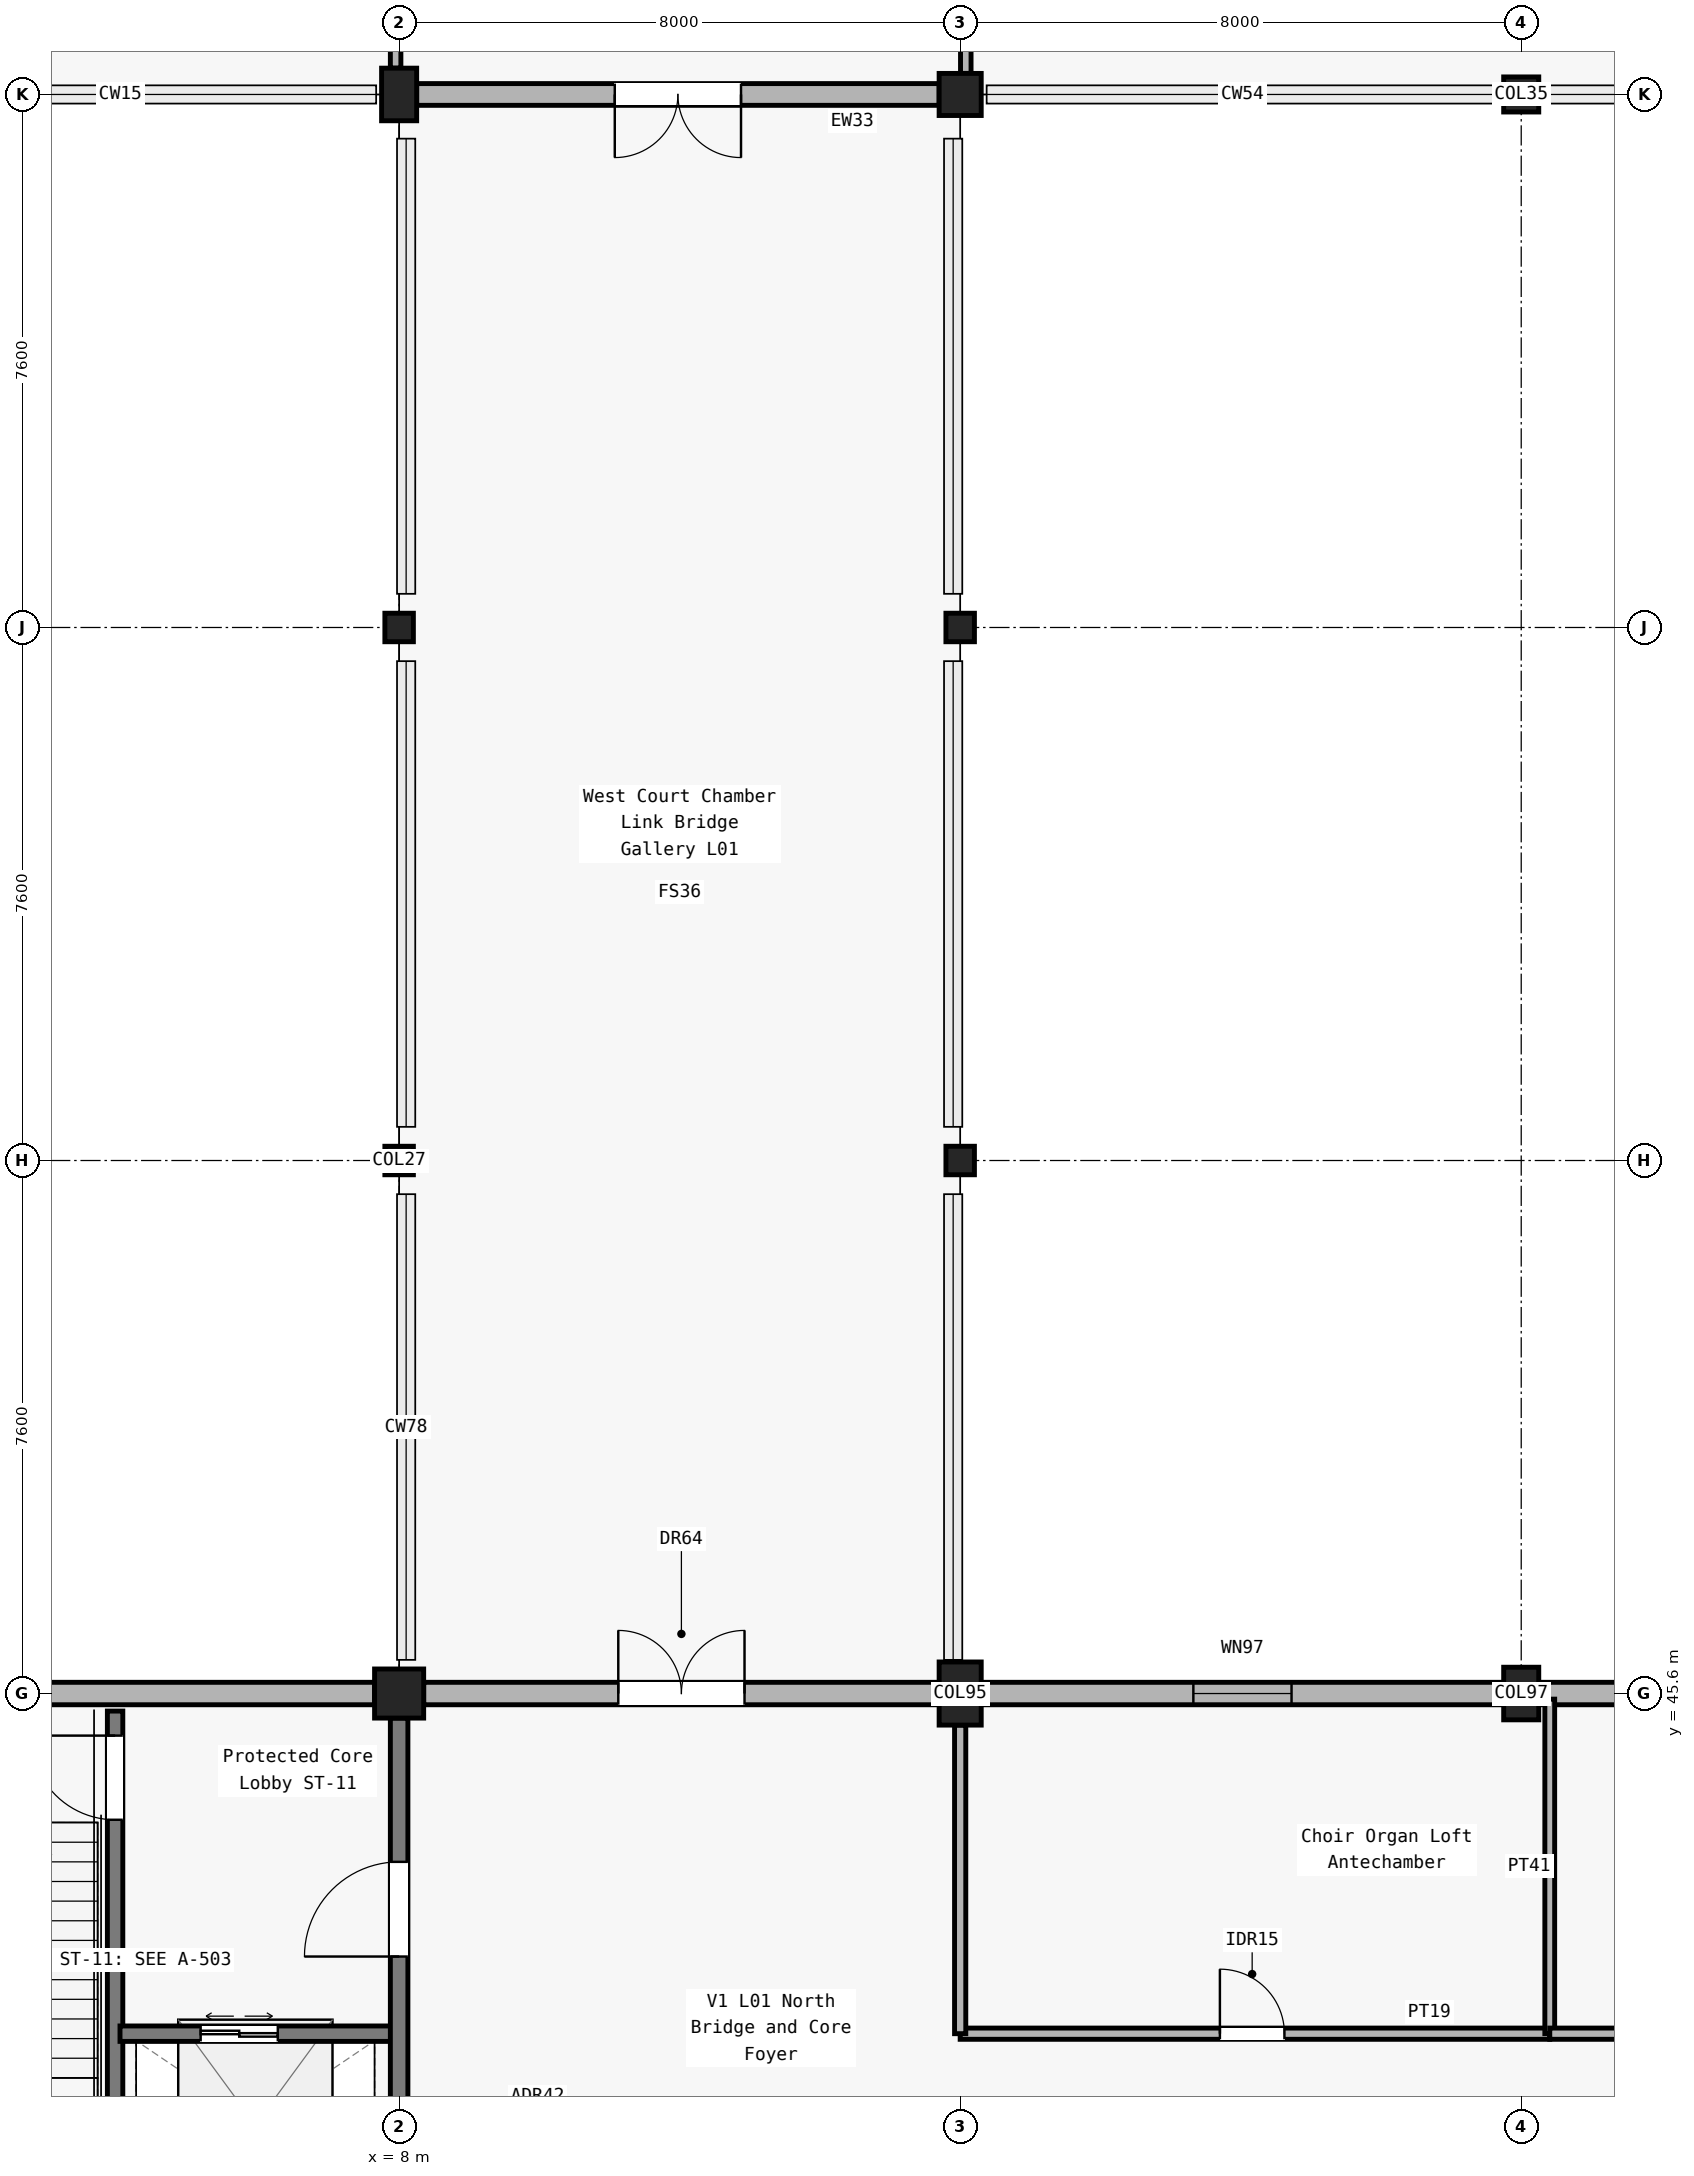
"""IFC4 building model, lengths in metres.
Left out: names, types, materials, properties, quantities, classifications, styles, units other than length and angle.
Written with IfcOpenShell. Run it as: python <this file> out.ifc"""

import sys

from ifc_helpers import new_model, si_unit, direction, frame, frame_2d, origin, origin_2d, place, context, subcontext, project, spatial, rectangle, hollow_circle, extrude, element, fill, save


model = new_model("IFC4")
c1 = context("Model", 3, precision=1e-05, world=origin(), true_north=direction((0.0, 1.0)))
c2 = subcontext(c1, "Body", "Model", "MODEL_VIEW")
j1 = project(units=[si_unit("LENGTHUNIT", "METRE"), si_unit("PLANEANGLEUNIT", "RADIAN")], contexts=[c1])
p1 = place(None, origin())
s1 = spatial("IfcSite", under=j1, at=p1, CompositionType="ELEMENT")
p2 = place(p1, origin())
s2 = spatial("IfcBuilding", under=s1, at=p2, CompositionType="ELEMENT")
p3 = place(p2, frame((0.0, 0.0, 5.4)))
s3 = spatial("IfcBuildingStorey", under=s2, at=p3, CompositionType="ELEMENT", Elevation=5.4)
p4 = place(p3, frame((8.0, 45.6, 0.0), z_axis=(0.0, 0.0, 1.0), x_axis=(1.0, 0.0, 0.0)))
e1 = element("IfcColumn", 1, at=p4, inside=s3, PredefinedType="COLUMN", context=c2, shape_type="SweptSolid", body=[
    extrude(rectangle(XDim=0.7, YDim=0.7, at=origin_2d()), origin(), (0.0, 0.0, 1.0), 4.8),
])
p5 = place(p3, frame((16.0, 45.6, 0.0), z_axis=(0.0, 0.0, 1.0), x_axis=(1.0, 0.0, 0.0)))
e2 = element("IfcColumn", 2, at=p5, inside=s3, PredefinedType="COLUMN", context=c2, shape_type="SweptSolid", body=[
    extrude(rectangle(XDim=0.6, YDim=0.9, at=origin_2d()), origin(), (0.0, 0.0, 1.0), 4.8),
])
for number, where, z_axis, x_axis in (
    (3, (24.0, 45.6, 0.0), (0.0, 0.0, 1.0), (1.0, 0.0, 0.0)),
    (4, (8.0, 68.4, 0.0), (0.0, 0.0, 1.0), (1.0, 0.0, 0.0)),
):
    element("IfcColumn", number, at=place(p3, frame(where, z_axis=z_axis, x_axis=x_axis)), inside=s3, PredefinedType="COLUMN", context=c2, shape_type="SweptSolid", body=[
        extrude(rectangle(XDim=0.5, YDim=0.75, at=origin_2d()), origin(), (0.0, 0.0, 1.0), 4.8),
    ])
p6 = place(p3, frame((16.0, 68.4, 0.0), z_axis=(0.0, 0.0, 1.0), x_axis=(1.0, 0.0, 0.0)))
e5 = element("IfcColumn", 5, at=p6, inside=s3, PredefinedType="COLUMN", context=c2, shape_type="SweptSolid", body=[
    extrude(rectangle(XDim=0.6, YDim=0.6, at=origin_2d()), origin(), (0.0, 0.0, 1.0), 4.8),
])
p7 = place(p3, frame((24.0, 68.4, 0.0), z_axis=(0.0, 0.0, 1.0), x_axis=(1.0, 0.0, 0.0)))
e6 = element("IfcColumn", 6, at=p7, inside=s3, PredefinedType="COLUMN", context=c2, shape_type="SweptSolid", body=[
    extrude(rectangle(XDim=0.5, YDim=0.5, at=origin_2d()), origin(), (0.0, 0.0, 1.0), 4.8),
])
for number, where, z_axis, x_axis in (
    (7, (8.0, 53.2, 0.0), (0.0, 0.0, 1.0), (1.0, 0.0, 0.0)),
    (8, (8.0, 60.8, 0.0), (0.0, 0.0, 1.0), (1.0, 0.0, 0.0)),
    (9, (16.0, 53.2, 0.0), (0.0, 0.0, 1.0), (1.0, 0.0, 0.0)),
    (10, (16.0, 60.8, 0.0), (0.0, 0.0, 1.0), (1.0, 0.0, 0.0)),
):
    element("IfcColumn", number, at=place(p3, frame(where, z_axis=z_axis, x_axis=x_axis)), inside=s3, PredefinedType="COLUMN", context=c2, shape_type="SweptSolid", body=[
        extrude(hollow_circle(Radius=0.203, WallThickness=0.02, at=origin_2d()), origin(), (0.0, 0.0, 1.0), 4.8),
    ])
p8 = place(p3, frame((0.4, 45.6, 0.0), z_axis=(0.0, 0.0, 1.0), x_axis=(1.0, 0.0, 0.0)))
e11 = element("IfcWall", 11, at=p8, inside=s3, PredefinedType="SOLIDWALL", context=c2, shape_type="SweptSolid", body=[
    extrude(rectangle(XDim=7.25, YDim=0.32, at=frame_2d((3.625, 0.0))), origin(), (0.0, 0.0, 1.0), 3.85),
])
p9 = place(p3, frame((8.35, 45.6, 0.0), z_axis=(0.0, 0.0, 1.0), x_axis=(1.0, 0.0, 0.0)))
e12 = element("IfcWall", 12, at=p9, inside=s3, PredefinedType="SOLIDWALL", context=c2, shape_type="SweptSolid", body=[
    extrude(rectangle(XDim=7.35, YDim=0.32, at=frame_2d((3.675, 0.0))), origin(), (0.0, 0.0, 1.0), 3.85),
])
p10 = place(p9, frame((2.775, 0.0, 0.0)))
e13 = element("IfcOpeningElement", 13, at=p10, cuts=e12, PredefinedType="OPENING", context=c2, shape_type="SweptSolid", body=[
    extrude(rectangle(XDim=1.8, YDim=2.25, at=frame_2d((0.9, 1.125))), frame((0.0, 0.17, 0.0), z_axis=(0.0, -1.0, 0.0), x_axis=(1.0, 0.0, 0.0)), (0.0, 0.0, 1.0), 0.34),
])
p11 = place(p3, frame((16.3, 45.6, 0.0), z_axis=(0.0, 0.0, 1.0), x_axis=(1.0, 0.0, 0.0)))
e14 = element("IfcWall", 14, at=p11, inside=s3, PredefinedType="SOLIDWALL", context=c2, shape_type="SweptSolid", body=[
    extrude(rectangle(XDim=7.45, YDim=0.32, at=frame_2d((3.725, 0.0))), origin(), (0.0, 0.0, 1.0), 3.85),
])
p12 = place(p11, frame((3.025, 0.0, 0.95)))
e15 = element("IfcOpeningElement", 15, at=p12, cuts=e14, PredefinedType="OPENING", context=c2, shape_type="SweptSolid", body=[
    extrude(rectangle(XDim=1.4, YDim=1.95, at=frame_2d((0.7, 0.975))), frame((0.0, 0.17, 0.0), z_axis=(0.0, -1.0, 0.0), x_axis=(1.0, 0.0, 0.0)), (0.0, 0.0, 1.0), 0.34),
])
p13 = place(p3, frame((24.25, 45.6, 0.0), z_axis=(0.0, 0.0, 1.0), x_axis=(1.0, 0.0, 0.0)))
e16 = element("IfcWall", 16, at=p13, inside=s3, PredefinedType="SOLIDWALL", context=c2, shape_type="SweptSolid", body=[
    extrude(rectangle(XDim=7.45, YDim=0.32, at=frame_2d((3.725, 0.0))), origin(), (0.0, 0.0, 1.0), 3.9),
])
p14 = place(p13, frame((2.925, 0.0, 0.95)))
e17 = element("IfcOpeningElement", 17, at=p14, cuts=e16, PredefinedType="OPENING", context=c2, shape_type="SweptSolid", body=[
    extrude(rectangle(XDim=1.6, YDim=1.95, at=frame_2d((0.8, 0.975))), frame((0.0, 0.17, 0.0), z_axis=(0.0, -1.0, 0.0), x_axis=(1.0, 0.0, 0.0)), (0.0, 0.0, 1.0), 0.34),
])
p15 = place(p3, frame((15.7, 68.4, 0.0), z_axis=(0.0, 0.0, 1.0), x_axis=(-1.0, 0.0, 0.0)))
e18 = element("IfcWall", 18, at=p15, inside=s3, PredefinedType="SOLIDWALL", context=c2, shape_type="SweptSolid", body=[
    extrude(rectangle(XDim=7.45, YDim=0.31, at=frame_2d((3.725, 0.0))), origin(), (0.0, 0.0, 1.0), 4.2),
])
p16 = place(p15, frame((2.825, 0.0, 0.0)))
e19 = element("IfcOpeningElement", 19, at=p16, cuts=e18, PredefinedType="OPENING", context=c2, shape_type="SweptSolid", body=[
    extrude(rectangle(XDim=1.8, YDim=2.25, at=frame_2d((0.9, 1.125))), frame((0.0, 0.165, 0.0), z_axis=(0.0, -1.0, 0.0), x_axis=(1.0, 0.0, 0.0)), (0.0, 0.0, 1.0), 0.33),
])
p17 = place(p3, frame((3.95, 38.25, 0.0), z_axis=(0.0, 0.0, 1.0), x_axis=(0.0, 1.0, 0.0)))
e20 = element("IfcWall", 20, at=p17, inside=s3, PredefinedType="SOLIDWALL", context=c2, shape_type="SweptSolid", body=[
    extrude(rectangle(XDim=7.1, YDim=0.22, at=frame_2d((3.55, 0.0))), origin(), (0.0, 0.0, 1.0), 4.51),
])
p18 = place(p17, frame((5.55, 0.0, 0.0)))
e21 = element("IfcOpeningElement", 21, at=p18, cuts=e20, PredefinedType="OPENING", context=c2, shape_type="SweptSolid", body=[
    extrude(rectangle(XDim=1.2, YDim=2.15, at=frame_2d((0.6, 1.075))), frame((0.0, 0.12, 0.0), z_axis=(0.0, -1.0, 0.0), x_axis=(1.0, 0.0, 0.0)), (0.0, 0.0, 1.0), 0.24),
])
p19 = place(p3, frame((4.02, 40.75, 0.0), z_axis=(0.0, 0.0, 1.0), x_axis=(1.0, 0.0, 0.0)))
e22 = element("IfcWall", 22, at=p19, inside=s3, PredefinedType="SOLIDWALL", context=c2, shape_type="SweptSolid", body=[
    extrude(rectangle(XDim=3.93, YDim=0.22, at=frame_2d((1.965, 0.0))), origin(), (0.0, 0.0, 1.0), 3.86),
])
p20 = place(p19, frame((1.15, 0.0, 0.0)))
e23 = element("IfcOpeningElement", 23, at=p20, cuts=e22, PredefinedType="OPENING", context=c2, shape_type="SweptSolid", body=[
    extrude(rectangle(XDim=1.1, YDim=2.2, at=frame_2d((0.55, 1.1))), frame((0.0, 0.12, 0.0), z_axis=(0.0, -1.0, 0.0), x_axis=(1.0, 0.0, 0.0)), (0.0, 0.0, 1.0), 0.24),
])
p21 = place(p3, frame((8.0, 38.4, 0.0), z_axis=(0.0, 0.0, 1.0), x_axis=(0.0, 1.0, 0.0)))
e24 = element("IfcWall", 24, at=p21, inside=s3, PredefinedType="SOLIDWALL", context=c2, shape_type="SweptSolid", body=[
    extrude(rectangle(XDim=6.85, YDim=0.25, at=frame_2d((3.425, 0.0))), origin(), (0.0, 0.0, 1.0), 3.635),
])
p22 = place(p21, frame((3.45, 0.0, 0.0)))
e25 = element("IfcOpeningElement", 25, at=p22, cuts=e24, PredefinedType="OPENING", context=c2, shape_type="SweptSolid", body=[
    extrude(rectangle(XDim=1.35, YDim=2.2, at=frame_2d((0.675, 1.1))), frame((0.0, 0.135, 0.0), z_axis=(0.0, -1.0, 0.0), x_axis=(1.0, 0.0, 0.0)), (0.0, 0.0, 1.0), 0.27),
])
p23 = place(p3, frame((16.0, 40.75, 0.0), z_axis=(0.0, 0.0, 1.0), x_axis=(1.0, 0.0, 0.0)))
e26 = element("IfcWall", 26, at=p23, inside=s3, PredefinedType="PARTITIONING", context=c2, shape_type="SweptSolid", body=[
    extrude(rectangle(XDim=8.407, YDim=0.16, at=frame_2d((4.204, 0.0))), origin(), (0.0, 0.0, 1.0), 3.81),
])
p24 = place(p23, frame((3.704, 0.0, 0.0)))
e27 = element("IfcOpeningElement", 27, at=p24, cuts=e26, PredefinedType="OPENING", context=c2, shape_type="SweptSolid", body=[
    extrude(rectangle(XDim=0.92, YDim=2.15, at=frame_2d((0.46, 1.075))), frame((0.0, 0.09, 0.0), z_axis=(0.0, -1.0, 0.0), x_axis=(1.0, 0.0, 0.0)), (0.0, 0.0, 1.0), 0.18),
])
p25 = place(p3, frame((24.407, 40.75, 0.0), z_axis=(0.0, 0.0, 1.0), x_axis=(0.0, 1.0, 0.0)))
e28 = element("IfcWall", 28, at=p25, inside=s3, PredefinedType="PARTITIONING", context=c2, shape_type="SweptSolid", body=[
    extrude(rectangle(XDim=4.77, YDim=0.14, at=frame_2d((2.385, 0.0))), origin(), (0.0, 0.0, 1.0), 3.81),
])
p26 = place(p3, frame((24.407, 40.75, 0.0), z_axis=(0.0, 0.0, 1.0), x_axis=(1.0, 0.0, 0.0)))
e29 = element("IfcWall", 29, at=p26, inside=s3, PredefinedType="PARTITIONING", context=c2, shape_type="SweptSolid", body=[
    extrude(rectangle(XDim=8.007, YDim=0.16, at=frame_2d((4.003, 0.0))), origin(), (0.0, 0.0, 1.0), 3.81),
])
p27 = place(p26, frame((2.847, 0.0, 0.0)))
e30 = element("IfcOpeningElement", 30, at=p27, cuts=e29, PredefinedType="OPENING", context=c2, shape_type="SweptSolid", body=[
    extrude(rectangle(XDim=0.98, YDim=2.15, at=frame_2d((0.49, 1.075))), frame((0.0, 0.09, 0.0), z_axis=(0.0, -1.0, 0.0), x_axis=(1.0, 0.0, 0.0)), (0.0, 0.0, 1.0), 0.18),
])
p28 = place(p3, frame((16.0, 40.75, 0.0), z_axis=(0.0, 0.0, 1.0), x_axis=(0.0, 1.0, 0.0)))
e31 = element("IfcWall", 31, at=p28, inside=s3, PredefinedType="PARTITIONING", context=c2, shape_type="SweptSolid", body=[
    extrude(rectangle(XDim=4.4, YDim=0.16, at=frame_2d((2.2, 0.0))), origin(), (0.0, 0.0, 1.0), 3.835),
])
p29 = place(p3, frame((7.95, 68.775, 0.0), z_axis=(0.0, 0.0, 1.0), x_axis=(0.0, 1.0, 0.0)))
e32 = element("IfcWall", 32, at=p29, inside=s3, PredefinedType="PARTITIONING", context=c2, shape_type="SweptSolid", body=[
    extrude(rectangle(XDim=37.225, YDim=0.15, at=frame_2d((18.613, 0.0))), origin(), (0.0, 0.0, 1.0), 2.69),
])
p30 = place(p29, frame((3.425, 0.0, 0.0)))
e33 = element("IfcOpeningElement", 33, at=p30, cuts=e32, PredefinedType="OPENING", context=c2, shape_type="SweptSolid", body=[
    extrude(rectangle(XDim=0.98, YDim=2.15, at=frame_2d((0.49, 1.075))), frame((0.0, 0.085, 0.0), z_axis=(0.0, -1.0, 0.0), x_axis=(1.0, 0.0, 0.0)), (0.0, 0.0, 1.0), 0.17),
])
p31 = place(p29, frame((26.225, 0.0, 0.0)))
e34 = element("IfcOpeningElement", 34, at=p31, cuts=e32, PredefinedType="OPENING", context=c2, shape_type="SweptSolid", body=[
    extrude(rectangle(XDim=1.01, YDim=2.15, at=frame_2d((0.505, 1.075))), frame((0.0, 0.085, 0.0), z_axis=(0.0, -1.0, 0.0), x_axis=(1.0, 0.0, 0.0)), (0.0, 0.0, 1.0), 0.17),
])
p32 = place(p3, frame((16.08, 68.7, 0.0), z_axis=(0.0, 0.0, 1.0), x_axis=(0.0, 1.0, 0.0)))
e35 = element("IfcWall", 35, at=p32, inside=s3, PredefinedType="PARTITIONING", context=c2, shape_type="SweptSolid", body=[
    extrude(rectangle(XDim=12.3, YDim=0.15, at=frame_2d((6.15, 0.0))), origin(), (0.0, 0.0, 1.0), 2.69),
])
p33 = place(p10, origin())
e36 = element("IfcDoor", 36, at=p33, inside=s3, OperationType="DOUBLE_DOOR_SINGLE_SWING", PredefinedType="DOOR", context=c2, shape_type="SweptSolid", body=[
    extrude(rectangle(XDim=1.8, YDim=2.25, at=frame_2d((0.9, 1.125))), frame((0.0, 0.025, 0.0), z_axis=(0.0, -1.0, 0.0), x_axis=(1.0, 0.0, 0.0)), (0.0, 0.0, 1.0), 0.05),
])
fill(e13, e36)
p34 = place(p12, origin())
e37 = element("IfcWindow", 37, at=p34, inside=s3, PartitioningType="SINGLE_PANEL", PredefinedType="WINDOW", context=c2, shape_type="SweptSolid", body=[
    extrude(rectangle(XDim=1.4, YDim=1.95, at=frame_2d((0.7, 0.975))), frame((0.0, 0.03, 0.0), z_axis=(0.0, -1.0, 0.0), x_axis=(1.0, 0.0, 0.0)), (0.0, 0.0, 1.0), 0.06),
])
fill(e15, e37)
p35 = place(p16, origin())
e38 = element("IfcDoor", 38, at=p35, inside=s3, OperationType="DOUBLE_DOOR_SINGLE_SWING", PredefinedType="DOOR", context=c2, shape_type="SweptSolid", body=[
    extrude(rectangle(XDim=1.8, YDim=2.25, at=frame_2d((0.9, 1.125))), frame((0.0, 0.025, 0.0), z_axis=(0.0, -1.0, 0.0), x_axis=(1.0, 0.0, 0.0)), (0.0, 0.0, 1.0), 0.05),
])
fill(e19, e38)
p36 = place(p18, origin())
e39 = element("IfcDoor", 39, at=p36, inside=s3, OperationType="SINGLE_SWING_RIGHT", PredefinedType="DOOR", context=c2, shape_type="SweptSolid", body=[
    extrude(rectangle(XDim=1.2, YDim=2.15, at=frame_2d((0.6, 1.075))), frame((0.0, 0.025, 0.0), z_axis=(0.0, -1.0, 0.0), x_axis=(1.0, 0.0, 0.0)), (0.0, 0.0, 1.0), 0.05),
])
fill(e21, e39)
p37 = place(p20, origin())
e40 = element("IfcDoor", 40, at=p37, inside=s3, OperationType="DOUBLE_DOOR_SLIDING", PredefinedType="DOOR", context=c2, shape_type="SweptSolid", body=[
    extrude(rectangle(XDim=1.1, YDim=2.2, at=frame_2d((0.55, 1.1))), frame((0.0, 0.025, 0.0), z_axis=(0.0, -1.0, 0.0), x_axis=(1.0, 0.0, 0.0)), (0.0, 0.0, 1.0), 0.05),
])
fill(e23, e40)
p38 = place(p22, origin())
e41 = element("IfcDoor", 41, at=p38, inside=s3, OperationType="SINGLE_SWING_LEFT", PredefinedType="DOOR", context=c2, shape_type="SweptSolid", body=[
    extrude(rectangle(XDim=1.35, YDim=2.2, at=frame_2d((0.675, 1.1))), frame((0.0, 0.025, 0.0), z_axis=(0.0, -1.0, 0.0), x_axis=(1.0, 0.0, 0.0)), (0.0, 0.0, 1.0), 0.05),
])
fill(e25, e41)
p39 = place(p24, origin())
e42 = element("IfcDoor", 42, at=p39, inside=s3, OperationType="SINGLE_SWING_LEFT", PredefinedType="DOOR", context=c2, shape_type="SweptSolid", body=[
    extrude(rectangle(XDim=0.92, YDim=2.15, at=frame_2d((0.46, 1.075))), frame((0.0, 0.025, 0.0), z_axis=(0.0, -1.0, 0.0), x_axis=(1.0, 0.0, 0.0)), (0.0, 0.0, 1.0), 0.05),
])
fill(e27, e42)
save(model, sys.argv[1])
